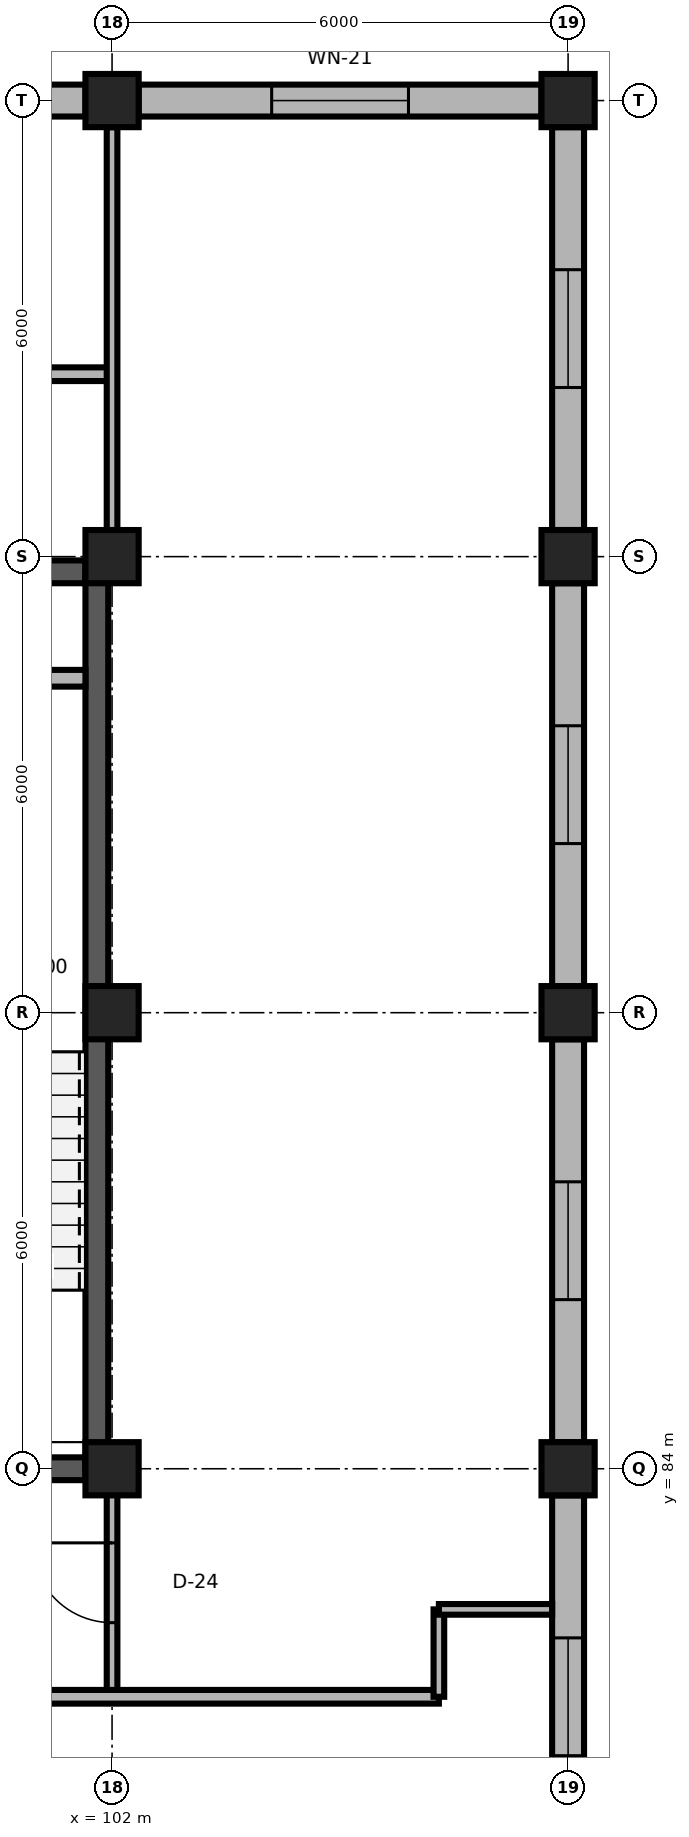
"""IFC4 building model, lengths in metres.
Left out: names, types, materials, properties, quantities, classifications, styles, units other than length and angle.
Written with IfcOpenShell. Run it as: python <this file> out.ifc"""

import sys

from ifc_helpers import new_model, si_unit, direction, frame, frame_2d, origin, origin_2d, place, context, subcontext, project, spatial, rectangle, extrude, element, fill, save


model = new_model("IFC4")
c1 = context("Model", 3, precision=1e-05, world=origin(), true_north=direction((0.0, 1.0)))
c2 = subcontext(c1, "Body", "Model", "MODEL_VIEW")
j1 = project(units=[si_unit("LENGTHUNIT", "METRE"), si_unit("PLANEANGLEUNIT", "RADIAN")], contexts=[c1])
p1 = place(None, origin())
s1 = spatial("IfcSite", under=j1, at=p1, CompositionType="ELEMENT")
p2 = place(p1, origin())
s2 = spatial("IfcBuilding", under=s1, at=p2, CompositionType="ELEMENT")
p3 = place(p2, frame((0.0, 0.0, 52.2)))
s3 = spatial("IfcBuildingStorey", under=s2, at=p3, CompositionType="ELEMENT", Elevation=52.2)
for number, where, z_axis, x_axis in (
    (1, (102.0, 84.0, 0.0), (0.0, 0.0, 1.0), (1.0, 0.0, 0.0)),
    (2, (108.0, 84.0, 0.0), (0.0, 0.0, 1.0), (1.0, 0.0, 0.0)),
    (3, (102.0, 90.0, 0.0), (0.0, 0.0, 1.0), (1.0, 0.0, 0.0)),
    (4, (108.0, 90.0, 0.0), (0.0, 0.0, 1.0), (1.0, 0.0, 0.0)),
    (5, (102.0, 96.0, 0.0), (0.0, 0.0, 1.0), (1.0, 0.0, 0.0)),
    (6, (108.0, 96.0, 0.0), (0.0, 0.0, 1.0), (1.0, 0.0, 0.0)),
    (7, (102.0, 102.0, 0.0), (0.0, 0.0, 1.0), (1.0, 0.0, 0.0)),
    (8, (108.0, 102.0, 0.0), (0.0, 0.0, 1.0), (1.0, 0.0, 0.0)),
):
    element("IfcColumn", number, at=place(p3, frame(where, z_axis=z_axis, x_axis=x_axis)), inside=s3, PredefinedType="COLUMN", context=c2, shape_type="SweptSolid", body=[
        extrude(rectangle(XDim=0.7, YDim=0.7, at=origin_2d()), origin(), (0.0, 0.0, 1.0), 3.9),
    ])
p4 = place(p3, frame((96.35, 102.0, 0.0), z_axis=(0.0, 0.0, 1.0), x_axis=(1.0, 0.0, 0.0)))
e9 = element("IfcWall", 9, at=p4, inside=s3, PredefinedType="SOLIDWALL", context=c2, shape_type="SweptSolid", body=[
    extrude(rectangle(XDim=5.3, YDim=0.42, at=frame_2d((2.65, 0.0))), origin(), (0.0, 0.0, 1.0), 3.32),
])
p5 = place(p4, frame((1.75, 0.0, 0.85)))
e10 = element("IfcOpeningElement", 10, at=p5, cuts=e9, PredefinedType="OPENING", context=c2, shape_type="SweptSolid", body=[
    extrude(rectangle(XDim=1.8, YDim=1.95, at=frame_2d((0.9, 0.975))), frame((0.0, 0.225, 0.0), z_axis=(0.0, -1.0, 0.0), x_axis=(1.0, 0.0, 0.0)), (0.0, 0.0, 1.0), 0.45),
])
p6 = place(p3, frame((102.35, 102.0, 0.0), z_axis=(0.0, 0.0, 1.0), x_axis=(1.0, 0.0, 0.0)))
e11 = element("IfcWall", 11, at=p6, inside=s3, PredefinedType="SOLIDWALL", context=c2, shape_type="SweptSolid", body=[
    extrude(rectangle(XDim=5.3, YDim=0.42, at=frame_2d((2.65, 0.0))), origin(), (0.0, 0.0, 1.0), 3.32),
])
p7 = place(p6, frame((1.75, 0.0, 0.85)))
e12 = element("IfcOpeningElement", 12, at=p7, cuts=e11, PredefinedType="OPENING", context=c2, shape_type="SweptSolid", body=[
    extrude(rectangle(XDim=1.8, YDim=1.95, at=frame_2d((0.9, 0.975))), frame((0.0, 0.225, 0.0), z_axis=(0.0, -1.0, 0.0), x_axis=(1.0, 0.0, 0.0)), (0.0, 0.0, 1.0), 0.45),
])
p8 = place(p3, frame((108.0, 78.35, 0.0), z_axis=(0.0, 0.0, 1.0), x_axis=(0.0, 1.0, 0.0)))
e13 = element("IfcWall", 13, at=p8, inside=s3, PredefinedType="SOLIDWALL", context=c2, shape_type="SweptSolid", body=[
    extrude(rectangle(XDim=5.3, YDim=0.42, at=frame_2d((2.65, 0.0))), origin(), (0.0, 0.0, 1.0), 3.32),
])
p9 = place(p8, frame((1.875, 0.0, 0.85)))
e14 = element("IfcOpeningElement", 14, at=p9, cuts=e13, PredefinedType="OPENING", context=c2, shape_type="SweptSolid", body=[
    extrude(rectangle(XDim=1.55, YDim=1.9, at=frame_2d((0.775, 0.95))), frame((0.0, 0.225, 0.0), z_axis=(0.0, -1.0, 0.0), x_axis=(1.0, 0.0, 0.0)), (0.0, 0.0, 1.0), 0.45),
])
p10 = place(p3, frame((108.0, 84.35, 0.0), z_axis=(0.0, 0.0, 1.0), x_axis=(0.0, 1.0, 0.0)))
e15 = element("IfcWall", 15, at=p10, inside=s3, PredefinedType="SOLIDWALL", context=c2, shape_type="SweptSolid", body=[
    extrude(rectangle(XDim=5.3, YDim=0.42, at=frame_2d((2.65, 0.0))), origin(), (0.0, 0.0, 1.0), 3.32),
])
p11 = place(p10, frame((1.875, 0.0, 0.85)))
e16 = element("IfcOpeningElement", 16, at=p11, cuts=e15, PredefinedType="OPENING", context=c2, shape_type="SweptSolid", body=[
    extrude(rectangle(XDim=1.55, YDim=1.9, at=frame_2d((0.775, 0.95))), frame((0.0, 0.225, 0.0), z_axis=(0.0, -1.0, 0.0), x_axis=(1.0, 0.0, 0.0)), (0.0, 0.0, 1.0), 0.45),
])
p12 = place(p3, frame((108.0, 90.35, 0.0), z_axis=(0.0, 0.0, 1.0), x_axis=(0.0, 1.0, 0.0)))
e17 = element("IfcWall", 17, at=p12, inside=s3, PredefinedType="SOLIDWALL", context=c2, shape_type="SweptSolid", body=[
    extrude(rectangle(XDim=5.3, YDim=0.42, at=frame_2d((2.65, 0.0))), origin(), (0.0, 0.0, 1.0), 3.32),
])
p13 = place(p12, frame((1.875, 0.0, 0.85)))
e18 = element("IfcOpeningElement", 18, at=p13, cuts=e17, PredefinedType="OPENING", context=c2, shape_type="SweptSolid", body=[
    extrude(rectangle(XDim=1.55, YDim=1.9, at=frame_2d((0.775, 0.95))), frame((0.0, 0.225, 0.0), z_axis=(0.0, -1.0, 0.0), x_axis=(1.0, 0.0, 0.0)), (0.0, 0.0, 1.0), 0.45),
])
p14 = place(p3, frame((108.0, 96.35, 0.0), z_axis=(0.0, 0.0, 1.0), x_axis=(0.0, 1.0, 0.0)))
e19 = element("IfcWall", 19, at=p14, inside=s3, PredefinedType="SOLIDWALL", context=c2, shape_type="SweptSolid", body=[
    extrude(rectangle(XDim=5.3, YDim=0.42, at=frame_2d((2.65, 0.0))), origin(), (0.0, 0.0, 1.0), 3.32),
])
p15 = place(p14, frame((1.875, 0.0, 0.85)))
e20 = element("IfcOpeningElement", 20, at=p15, cuts=e19, PredefinedType="OPENING", context=c2, shape_type="SweptSolid", body=[
    extrude(rectangle(XDim=1.55, YDim=1.9, at=frame_2d((0.775, 0.95))), frame((0.0, 0.225, 0.0), z_axis=(0.0, -1.0, 0.0), x_axis=(1.0, 0.0, 0.0)), (0.0, 0.0, 1.0), 0.45),
])
p16 = place(p3, frame((96.35, 84.0, 0.0), z_axis=(0.0, 0.0, 1.0), x_axis=(1.0, 0.0, 0.0)))
e21 = element("IfcWall", 21, at=p16, inside=s3, PredefinedType="SHEAR", context=c2, shape_type="SweptSolid", body=[
    extrude(rectangle(XDim=5.3, YDim=0.3, at=frame_2d((2.65, 0.0))), origin(), (0.0, 0.0, 1.0), 3.66),
])
p17 = place(p16, frame((1.975, 0.0, 0.0)))
e22 = element("IfcOpeningElement", 22, at=p17, cuts=e21, PredefinedType="OPENING", context=c2, shape_type="SweptSolid", body=[
    extrude(rectangle(XDim=1.35, YDim=2.2, at=frame_2d((0.675, 1.1))), frame((0.0, 0.165, 0.0), z_axis=(0.0, -1.0, 0.0), x_axis=(1.0, 0.0, 0.0)), (0.0, 0.0, 1.0), 0.33),
])
p18 = place(p3, frame((96.35, 95.8, 0.0), z_axis=(0.0, 0.0, 1.0), x_axis=(1.0, 0.0, 0.0)))
e23 = element("IfcWall", 23, at=p18, inside=s3, PredefinedType="SHEAR", context=c2, shape_type="SweptSolid", body=[
    extrude(rectangle(XDim=5.3, YDim=0.3, at=frame_2d((2.65, 0.0))), origin(), (0.0, 0.0, 1.0), 3.74),
])
p19 = place(p3, frame((101.8, 84.0, 0.0), z_axis=(0.0, 0.0, 1.0), x_axis=(0.0, 1.0, 0.0)))
e24 = element("IfcWall", 24, at=p19, inside=s3, PredefinedType="SHEAR", context=c2, shape_type="SweptSolid", body=[
    extrude(rectangle(XDim=11.8, YDim=0.3, at=frame_2d((5.9, 0.0))), origin(), (0.0, 0.0, 1.0), 3.74),
])
p20 = place(p3, frame((100.55, 94.4, 0.0), z_axis=(0.0, 0.0, 1.0), x_axis=(1.0, 0.0, 0.0)))
e25 = element("IfcWall", 25, at=p20, inside=s3, PredefinedType="PARTITIONING", context=c2, shape_type="SweptSolid", body=[
    extrude(rectangle(XDim=1.1, YDim=0.22, at=frame_2d((0.55, 0.0))), origin(), (0.0, 0.0, 1.0), 3.74),
])
p21 = place(p3, frame((102.0, 81.05, 0.0), z_axis=(0.0, 0.0, 1.0), x_axis=(0.0, 1.0, 0.0)))
e26 = element("IfcWall", 26, at=p21, inside=s3, PredefinedType="PARTITIONING", context=c2, shape_type="SweptSolid", body=[
    extrude(rectangle(XDim=2.9, YDim=0.14, at=frame_2d((1.45, 0.0))), origin(), (0.0, 0.0, 1.0), 3.449),
])
p22 = place(p21, frame((0.925, 0.0, 0.0)))
e27 = element("IfcOpeningElement", 27, at=p22, cuts=e26, PredefinedType="OPENING", context=c2, shape_type="SweptSolid", body=[
    extrude(rectangle(XDim=1.05, YDim=2.25, at=frame_2d((0.525, 1.125))), frame((0.0, 0.085, 0.0), z_axis=(0.0, -1.0, 0.0), x_axis=(1.0, 0.0, 0.0)), (0.0, 0.0, 1.0), 0.17),
])
p23 = place(p3, frame((96.0, 81.0, 0.0), z_axis=(0.0, 0.0, 1.0), x_axis=(1.0, 0.0, 0.0)))
e28 = element("IfcWall", 28, at=p23, inside=s3, PredefinedType="PARTITIONING", context=c2, shape_type="SweptSolid", body=[
    extrude(rectangle(XDim=10.3, YDim=0.18, at=frame_2d((5.15, 0.0))), origin(), (0.0, 0.0, 1.0), 3.74),
])
p24 = place(p3, frame((106.3, 81.0, 0.0), z_axis=(0.0, 0.0, 1.0), x_axis=(0.0, 1.0, 0.0)))
e29 = element("IfcWall", 29, at=p24, inside=s3, PredefinedType="PARTITIONING", context=c2, shape_type="SweptSolid", body=[
    extrude(rectangle(XDim=1.15, YDim=0.14, at=frame_2d((0.575, 0.0))), origin(), (0.0, 0.0, 1.0), 3.74),
])
p25 = place(p3, frame((106.3, 82.15, 0.0), z_axis=(0.0, 0.0, 1.0), x_axis=(1.0, 0.0, 0.0)))
e30 = element("IfcWall", 30, at=p25, inside=s3, PredefinedType="PARTITIONING", context=c2, shape_type="SweptSolid", body=[
    extrude(rectangle(XDim=1.49, YDim=0.14, at=frame_2d((0.745, 0.0))), origin(), (0.0, 0.0, 1.0), 3.74),
])
p26 = place(p3, frame((96.0, 98.4, 0.0), z_axis=(0.0, 0.0, 1.0), x_axis=(1.0, 0.0, 0.0)))
e31 = element("IfcWall", 31, at=p26, inside=s3, PredefinedType="PARTITIONING", context=c2, shape_type="SweptSolid", body=[
    extrude(rectangle(XDim=6.0, YDim=0.18, at=frame_2d((3.0, 0.0))), origin(), (0.0, 0.0, 1.0), 3.74),
])
p27 = place(p3, frame((102.0, 96.35, 0.0), z_axis=(0.0, 0.0, 1.0), x_axis=(0.0, 1.0, 0.0)))
e32 = element("IfcWall", 32, at=p27, inside=s3, PredefinedType="PARTITIONING", context=c2, shape_type="SweptSolid", body=[
    extrude(rectangle(XDim=5.3, YDim=0.14, at=frame_2d((2.65, 0.0))), origin(), (0.0, 0.0, 1.0), 3.449),
])
p28 = place(p7, origin())
e33 = element("IfcWindow", 33, at=p28, inside=s3, PartitioningType="SINGLE_PANEL", PredefinedType="WINDOW", context=c2, shape_type="SweptSolid", body=[
    extrude(rectangle(XDim=1.8, YDim=1.95, at=frame_2d((0.9, 0.975))), frame((0.0, 0.03, 0.0), z_axis=(0.0, -1.0, 0.0), x_axis=(1.0, 0.0, 0.0)), (0.0, 0.0, 1.0), 0.06),
])
fill(e12, e33)
p29 = place(p9, origin())
e34 = element("IfcWindow", 34, at=p29, inside=s3, PartitioningType="SINGLE_PANEL", PredefinedType="WINDOW", context=c2, shape_type="SweptSolid", body=[
    extrude(rectangle(XDim=1.55, YDim=1.9, at=frame_2d((0.775, 0.95))), frame((0.0, 0.03, 0.0), z_axis=(0.0, -1.0, 0.0), x_axis=(1.0, 0.0, 0.0)), (0.0, 0.0, 1.0), 0.06),
])
fill(e14, e34)
p30 = place(p11, origin())
e35 = element("IfcWindow", 35, at=p30, inside=s3, PartitioningType="SINGLE_PANEL", PredefinedType="WINDOW", context=c2, shape_type="SweptSolid", body=[
    extrude(rectangle(XDim=1.55, YDim=1.9, at=frame_2d((0.775, 0.95))), frame((0.0, 0.03, 0.0), z_axis=(0.0, -1.0, 0.0), x_axis=(1.0, 0.0, 0.0)), (0.0, 0.0, 1.0), 0.06),
])
fill(e16, e35)
p31 = place(p13, origin())
e36 = element("IfcWindow", 36, at=p31, inside=s3, PartitioningType="SINGLE_PANEL", PredefinedType="WINDOW", context=c2, shape_type="SweptSolid", body=[
    extrude(rectangle(XDim=1.55, YDim=1.9, at=frame_2d((0.775, 0.95))), frame((0.0, 0.03, 0.0), z_axis=(0.0, -1.0, 0.0), x_axis=(1.0, 0.0, 0.0)), (0.0, 0.0, 1.0), 0.06),
])
fill(e18, e36)
p32 = place(p15, origin())
e37 = element("IfcWindow", 37, at=p32, inside=s3, PartitioningType="SINGLE_PANEL", PredefinedType="WINDOW", context=c2, shape_type="SweptSolid", body=[
    extrude(rectangle(XDim=1.55, YDim=1.9, at=frame_2d((0.775, 0.95))), frame((0.0, 0.03, 0.0), z_axis=(0.0, -1.0, 0.0), x_axis=(1.0, 0.0, 0.0)), (0.0, 0.0, 1.0), 0.06),
])
fill(e20, e37)
p33 = place(p22, origin())
e38 = element("IfcDoor", 38, at=p33, inside=s3, OperationType="SINGLE_SWING_RIGHT", PredefinedType="DOOR", context=c2, shape_type="SweptSolid", body=[
    extrude(rectangle(XDim=1.05, YDim=2.25, at=frame_2d((0.525, 1.125))), frame((0.0, 0.025, 0.0), z_axis=(0.0, -1.0, 0.0), x_axis=(1.0, 0.0, 0.0)), (0.0, 0.0, 1.0), 0.05),
])
fill(e27, e38)
save(model, sys.argv[1])
